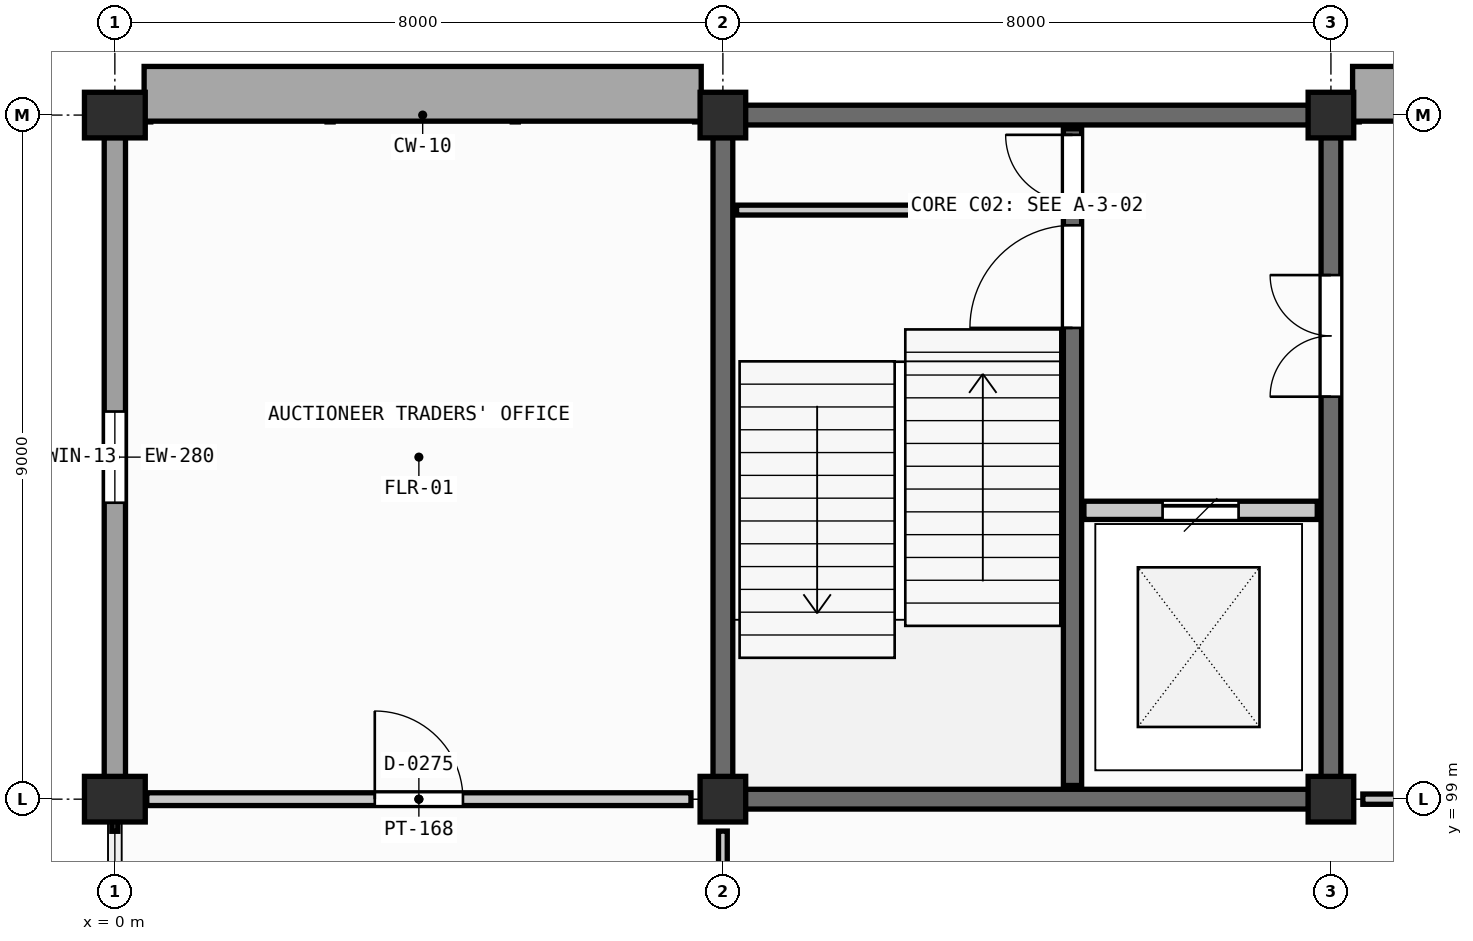
"""IFC4 building model, lengths in metres.
Left out: names, types, materials, properties, quantities, classifications, styles, units other than length and angle.
Written with IfcOpenShell. Run it as: python <this file> out.ifc"""

import sys

from ifc_helpers import new_model, si_unit, direction, frame, frame_2d, origin, origin_2d, place, context, subcontext, project, spatial, rectangle, extrude, element, fill, save


model = new_model("IFC4")
c1 = context("Model", 3, precision=1e-05, world=origin(), true_north=direction((0.0, 1.0)))
c2 = subcontext(c1, "Body", "Model", "MODEL_VIEW")
j1 = project(units=[si_unit("LENGTHUNIT", "METRE"), si_unit("PLANEANGLEUNIT", "RADIAN")], contexts=[c1])
p1 = place(None, origin())
s1 = spatial("IfcSite", under=j1, at=p1, CompositionType="ELEMENT")
p2 = place(p1, origin())
s2 = spatial("IfcBuilding", under=s1, at=p2, CompositionType="ELEMENT")
p3 = place(p2, frame((0.0, 0.0, 9.0)))
s3 = spatial("IfcBuildingStorey", under=s2, at=p3, CompositionType="ELEMENT", Elevation=9.0)
for number, where, z_axis, x_axis in (
    (1, (0.0, 99.0, 0.0), (0.0, 0.0, 1.0), (1.0, 0.0, 0.0)),
    (2, (0.0, 108.0, 0.0), (0.0, 0.0, 1.0), (1.0, 0.0, 0.0)),
):
    element("IfcColumn", number, at=place(p3, frame(where, z_axis=z_axis, x_axis=x_axis)), inside=s3, PredefinedType="COLUMN", context=c2, shape_type="SweptSolid", body=[
        extrude(rectangle(XDim=0.8, YDim=0.6, at=origin_2d()), origin(), (0.0, 0.0, 1.0), 4.2),
    ])
for number, where, z_axis, x_axis in (
    (3, (8.0, 99.0, 0.0), (0.0, 0.0, 1.0), (1.0, 0.0, 0.0)),
    (4, (8.0, 108.0, 0.0), (0.0, 0.0, 1.0), (1.0, 0.0, 0.0)),
    (5, (16.0, 99.0, 0.0), (0.0, 0.0, 1.0), (1.0, 0.0, 0.0)),
    (6, (16.0, 108.0, 0.0), (0.0, 0.0, 1.0), (1.0, 0.0, 0.0)),
):
    element("IfcColumn", number, at=place(p3, frame(where, z_axis=z_axis, x_axis=x_axis)), inside=s3, PredefinedType="COLUMN", context=c2, shape_type="SweptSolid", body=[
        extrude(rectangle(XDim=0.6, YDim=0.6, at=origin_2d()), origin(), (0.0, 0.0, 1.0), 4.2),
    ])
p4 = place(p3, frame((0.0, 107.705, 0.0), z_axis=(0.0, 0.0, 1.0), x_axis=(0.0, -1.0, 0.0)))
e7 = element("IfcWall", 7, at=p4, inside=s3, PredefinedType="SOLIDWALL", context=c2, shape_type="SweptSolid", body=[
    extrude(rectangle(XDim=8.41, YDim=0.28, at=frame_2d((4.205, 0.0))), origin(), (0.0, 0.0, 1.0), 3.05),
])
p5 = place(p4, frame((3.605, 0.0, 1.0)))
e8 = element("IfcOpeningElement", 8, at=p5, cuts=e7, PredefinedType="OPENING", context=c2, shape_type="SweptSolid", body=[
    extrude(rectangle(XDim=1.2, YDim=1.6, at=frame_2d((0.6, 0.8))), frame((0.0, 0.15, 0.0), z_axis=(0.0, -1.0, 0.0), x_axis=(1.0, 0.0, 0.0)), (0.0, 0.0, 1.0), 0.3),
])
for number, where, z_axis, x_axis in (
    (9, (8.295, 99.0, 0.0), (0.0, 0.0, 1.0), (1.0, 0.0, 0.0)),
    (10, (8.295, 108.0, 0.0), (0.0, 0.0, 1.0), (1.0, 0.0, 0.0)),
):
    element("IfcWall", number, at=place(p3, frame(where, z_axis=z_axis, x_axis=x_axis)), inside=s3, PredefinedType="SHEAR", context=c2, shape_type="SweptSolid", body=[
        extrude(rectangle(XDim=7.41, YDim=0.26, at=frame_2d((3.705, 0.0))), origin(), (0.0, 0.0, 1.0), 3.985),
    ])
p6 = place(p3, frame((8.0, 99.295, 0.0), z_axis=(0.0, 0.0, 1.0), x_axis=(0.0, 1.0, 0.0)))
e11 = element("IfcWall", 11, at=p6, inside=s3, PredefinedType="SHEAR", context=c2, shape_type="SweptSolid", body=[
    extrude(rectangle(XDim=8.41, YDim=0.26, at=frame_2d((4.205, 0.0))), origin(), (0.0, 0.0, 1.0), 3.985),
])
p7 = place(p3, frame((16.0, 99.295, 0.0), z_axis=(0.0, 0.0, 1.0), x_axis=(0.0, 1.0, 0.0)))
e12 = element("IfcWall", 12, at=p7, inside=s3, PredefinedType="SHEAR", context=c2, shape_type="SweptSolid", body=[
    extrude(rectangle(XDim=8.41, YDim=0.26, at=frame_2d((4.205, 0.0))), origin(), (0.0, 0.0, 1.0), 3.985),
])
p8 = place(p7, frame((5.0, 0.0, 0.0)))
e13 = element("IfcOpeningElement", 13, at=p8, cuts=e12, PredefinedType="OPENING", context=c2, shape_type="SweptSolid", body=[
    extrude(rectangle(XDim=1.6, YDim=2.2, at=frame_2d((0.8, 1.1))), frame((0.0, 0.14, 0.0), z_axis=(0.0, -1.0, 0.0), x_axis=(1.0, 0.0, 0.0)), (0.0, 0.0, 1.0), 0.28),
])
p9 = place(p3, frame((12.6, 99.18, 0.0), z_axis=(0.0, 0.0, 1.0), x_axis=(0.0, 1.0, 0.0)))
e14 = element("IfcWall", 14, at=p9, inside=s3, PredefinedType="SHEAR", context=c2, shape_type="SweptSolid", body=[
    extrude(rectangle(XDim=8.64, YDim=0.24, at=frame_2d((4.32, 0.0))), origin(), (0.0, 0.0, 1.0), 3.985),
])
p10 = place(p9, frame((6.02, 0.0, 0.0)))
e15 = element("IfcOpeningElement", 15, at=p10, cuts=e14, PredefinedType="OPENING", context=c2, shape_type="SweptSolid", body=[
    extrude(rectangle(XDim=1.35, YDim=2.2, at=frame_2d((0.675, 1.1))), frame((0.0, 0.13, 0.0), z_axis=(0.0, -1.0, 0.0), x_axis=(1.0, 0.0, 0.0)), (0.0, 0.0, 1.0), 0.26),
])
p11 = place(p9, frame((7.68, 0.0, 0.0)))
e16 = element("IfcOpeningElement", 16, at=p11, cuts=e14, PredefinedType="OPENING", context=c2, shape_type="SweptSolid", body=[
    extrude(rectangle(XDim=0.88, YDim=2.02, at=frame_2d((0.44, 1.01))), frame((0.0, 0.13, 0.0), z_axis=(0.0, -1.0, 0.0), x_axis=(1.0, 0.0, 0.0)), (0.0, 0.0, 1.0), 0.26),
])
p12 = place(p3, frame((8.18, 106.75, 0.0), z_axis=(0.0, 0.0, 1.0), x_axis=(1.0, 0.0, 0.0)))
e17 = element("IfcWall", 17, at=p12, inside=s3, PredefinedType="PARTITIONING", context=c2, shape_type="SweptSolid", body=[
    extrude(rectangle(XDim=4.28, YDim=0.13, at=frame_2d((2.14, 0.0))), origin(), (0.0, 0.0, 1.0), 3.335),
])
p13 = place(p3, frame((12.75, 102.8, 0.0), z_axis=(0.0, 0.0, 1.0), x_axis=(1.0, 0.0, 0.0)))
e18 = element("IfcWall", 18, at=p13, inside=s3, PredefinedType="SHEAR", context=c2, shape_type="SweptSolid", body=[
    extrude(rectangle(XDim=3.07, YDim=0.24, at=frame_2d((1.535, 0.0))), origin(), (0.0, 0.0, 1.0), 3.335),
])
p14 = place(p13, frame((1.035, 0.0, 0.0)))
e19 = element("IfcOpeningElement", 19, at=p14, cuts=e18, PredefinedType="OPENING", context=c2, shape_type="SweptSolid", body=[
    extrude(rectangle(XDim=1.0, YDim=2.15, at=frame_2d((0.5, 1.075))), frame((0.0, 0.13, 0.0), z_axis=(0.0, -1.0, 0.0), x_axis=(1.0, 0.0, 0.0)), (0.0, 0.0, 1.0), 0.26),
])
p15 = place(p3, frame((8.0, 90.42, 0.0), z_axis=(0.0, 0.0, 1.0), x_axis=(0.0, 1.0, 0.0)))
e20 = element("IfcWall", 20, at=p15, inside=s3, PredefinedType="PARTITIONING", context=c2, shape_type="SweptSolid", body=[
    extrude(rectangle(XDim=8.16, YDim=0.115, at=frame_2d((4.08, 0.0))), origin(), (0.0, 0.0, 1.0), 3.05),
])
p16 = place(p15, frame((3.105, 0.0, 0.0)))
e21 = element("IfcOpeningElement", 21, at=p16, cuts=e20, PredefinedType="OPENING", context=c2, shape_type="SweptSolid", body=[
    extrude(rectangle(XDim=1.95, YDim=2.3, at=frame_2d((0.975, 1.15))), frame((0.0, 0.067, 0.0), z_axis=(0.0, -1.0, 0.0), x_axis=(1.0, 0.0, 0.0)), (0.0, 0.0, 1.0), 0.135),
])
p17 = place(p3, frame((0.42, 99.0, 0.0), z_axis=(0.0, 0.0, 1.0), x_axis=(1.0, 0.0, 0.0)))
e22 = element("IfcWall", 22, at=p17, inside=s3, PredefinedType="PARTITIONING", context=c2, shape_type="SweptSolid", body=[
    extrude(rectangle(XDim=7.16, YDim=0.168, at=frame_2d((3.58, 0.0))), origin(), (0.0, 0.0, 1.0), 3.05),
])
p18 = place(p17, frame((3.0, 0.0, 0.0)))
e23 = element("IfcOpeningElement", 23, at=p18, cuts=e22, PredefinedType="OPENING", context=c2, shape_type="SweptSolid", body=[
    extrude(rectangle(XDim=1.16, YDim=2.21, at=frame_2d((0.58, 1.105))), frame((0.0, 0.094, 0.0), z_axis=(0.0, -1.0, 0.0), x_axis=(1.0, 0.0, 0.0)), (0.0, 0.0, 1.0), 0.188),
])
p19 = place(p3, frame((16.42, 99.0, 0.0), z_axis=(0.0, 0.0, 1.0), x_axis=(1.0, 0.0, 0.0)))
e24 = element("IfcWall", 24, at=p19, inside=s3, PredefinedType="PLUMBINGWALL", context=c2, shape_type="SweptSolid", body=[
    extrude(rectangle(XDim=7.16, YDim=0.135, at=frame_2d((3.58, 0.0))), origin(), (0.0, 0.0, 1.0), 3.05),
])
p20 = place(p19, frame((3.12, 0.0, 0.0)))
e25 = element("IfcOpeningElement", 25, at=p20, cuts=e24, PredefinedType="OPENING", context=c2, shape_type="SweptSolid", body=[
    extrude(rectangle(XDim=0.92, YDim=2.08, at=frame_2d((0.46, 1.04))), frame((0.0, 0.078, 0.0), z_axis=(0.0, -1.0, 0.0), x_axis=(1.0, 0.0, 0.0)), (0.0, 0.0, 1.0), 0.155),
])
p21 = place(p5, origin())
e26 = element("IfcWindow", 26, at=p21, inside=s3, PartitioningType="SINGLE_PANEL", PredefinedType="WINDOW", context=c2, shape_type="SweptSolid", body=[
    extrude(rectangle(XDim=1.2, YDim=1.6, at=frame_2d((0.6, 0.8))), frame((0.0, 0.03, 0.0), z_axis=(0.0, -1.0, 0.0), x_axis=(1.0, 0.0, 0.0)), (0.0, 0.0, 1.0), 0.06),
])
fill(e8, e26)
p22 = place(p10, origin())
e27 = element("IfcDoor", 27, at=p22, inside=s3, OperationType="SINGLE_SWING_LEFT", PredefinedType="DOOR", context=c2, shape_type="SweptSolid", body=[
    extrude(rectangle(XDim=1.35, YDim=2.2, at=frame_2d((0.675, 1.1))), frame((0.0, 0.025, 0.0), z_axis=(0.0, -1.0, 0.0), x_axis=(1.0, 0.0, 0.0)), (0.0, 0.0, 1.0), 0.05),
])
fill(e15, e27)
p23 = place(p11, origin())
e28 = element("IfcDoor", 28, at=p23, inside=s3, OperationType="SINGLE_SWING_RIGHT", PredefinedType="DOOR", context=c2, shape_type="SweptSolid", body=[
    extrude(rectangle(XDim=0.88, YDim=2.02, at=frame_2d((0.44, 1.01))), frame((0.0, 0.025, 0.0), z_axis=(0.0, -1.0, 0.0), x_axis=(1.0, 0.0, 0.0)), (0.0, 0.0, 1.0), 0.05),
])
fill(e16, e28)
p24 = place(p8, origin())
e29 = element("IfcDoor", 29, at=p24, inside=s3, OperationType="DOUBLE_DOOR_SINGLE_SWING", PredefinedType="DOOR", context=c2, shape_type="SweptSolid", body=[
    extrude(rectangle(XDim=1.6, YDim=2.2, at=frame_2d((0.8, 1.1))), frame((0.0, 0.025, 0.0), z_axis=(0.0, -1.0, 0.0), x_axis=(1.0, 0.0, 0.0)), (0.0, 0.0, 1.0), 0.05),
])
fill(e13, e29)
p25 = place(p14, origin())
e30 = element("IfcDoor", 30, at=p25, inside=s3, OperationType="SLIDING_TO_LEFT", PredefinedType="DOOR", context=c2, shape_type="SweptSolid", body=[
    extrude(rectangle(XDim=1.0, YDim=2.15, at=frame_2d((0.5, 1.075))), frame((0.0, 0.025, 0.0), z_axis=(0.0, -1.0, 0.0), x_axis=(1.0, 0.0, 0.0)), (0.0, 0.0, 1.0), 0.05),
])
fill(e19, e30)
p26 = place(p18, origin())
e31 = element("IfcDoor", 31, at=p26, inside=s3, OperationType="SINGLE_SWING_LEFT", PredefinedType="DOOR", context=c2, shape_type="SweptSolid", body=[
    extrude(rectangle(XDim=1.16, YDim=2.21, at=frame_2d((0.58, 1.105))), frame((0.0, 0.025, 0.0), z_axis=(0.0, -1.0, 0.0), x_axis=(1.0, 0.0, 0.0)), (0.0, 0.0, 1.0), 0.05),
])
fill(e23, e31)
save(model, sys.argv[1])
